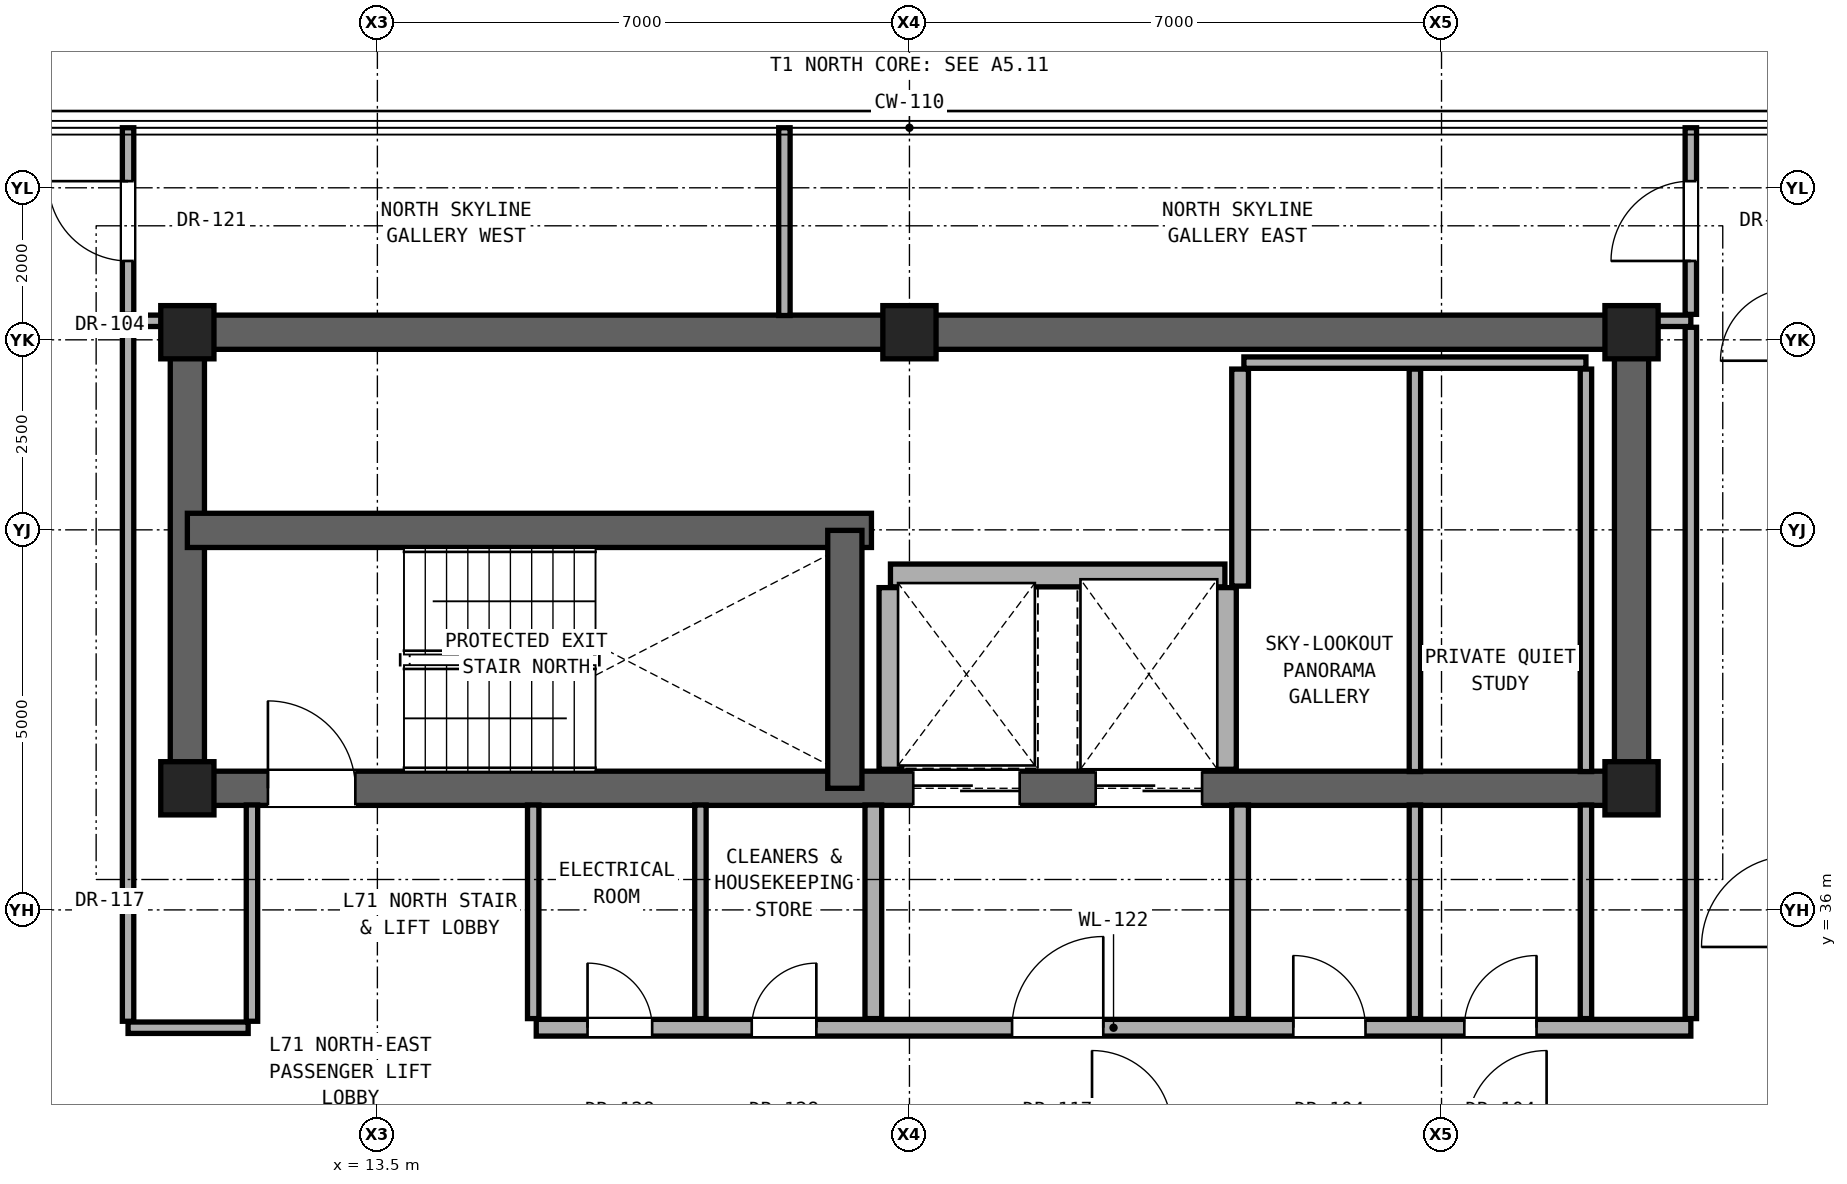
"""IFC4 building model, lengths in metres.
Left out: names, types, materials, properties, quantities, classifications, styles, units other than length and angle.
Written with IfcOpenShell. Run it as: python <this file> out.ifc"""

import sys

from ifc_helpers import new_model, si_unit, direction, frame, frame_2d, origin, origin_2d, place, context, subcontext, project, spatial, rectangle, extrude, element, fill, save


model = new_model("IFC4")
c1 = context("Model", 3, precision=1e-05, world=origin(), true_north=direction((0.0, 1.0)))
c2 = subcontext(c1, "Body", "Model", "MODEL_VIEW")
j1 = project(units=[si_unit("LENGTHUNIT", "METRE"), si_unit("PLANEANGLEUNIT", "RADIAN")], contexts=[c1])
p1 = place(None, origin())
s1 = spatial("IfcSite", under=j1, at=p1, CompositionType="ELEMENT")
p2 = place(p1, origin())
s2 = spatial("IfcBuilding", under=s1, at=p2, CompositionType="ELEMENT")
p3 = place(p2, frame((0.0, 0.0, 249.1)))
s3 = spatial("IfcBuildingStorey", under=s2, at=p3, CompositionType="ELEMENT", Elevation=249.1)
for number, where, z_axis, x_axis in (
    (1, (11.0, 37.6, 0.0), (0.0, 0.0, 1.0), (1.0, 0.0, 0.0)),
    (2, (30.0, 37.6, 0.0), (0.0, 0.0, 1.0), (1.0, 0.0, 0.0)),
    (3, (11.0, 43.6, 0.0), (0.0, 0.0, 1.0), (1.0, 0.0, 0.0)),
    (4, (20.5, 43.6, 0.0), (0.0, 0.0, 1.0), (1.0, 0.0, 0.0)),
    (5, (30.0, 43.6, 0.0), (0.0, 0.0, 1.0), (1.0, 0.0, 0.0)),
):
    element("IfcColumn", number, at=place(p3, frame(where, z_axis=z_axis, x_axis=x_axis)), inside=s3, PredefinedType="COLUMN", context=c2, shape_type="SweptSolid", body=[
        extrude(rectangle(XDim=0.7, YDim=0.7, at=origin_2d()), origin(), (0.0, 0.0, 1.0), 3.6),
    ])
p4 = place(p3, frame((11.0, 43.6, 0.0), z_axis=(0.0, 0.0, 1.0), x_axis=(1.0, 0.0, 0.0)))
e6 = element("IfcWall", 6, at=p4, inside=s3, PredefinedType="SHEAR", context=c2, shape_type="SweptSolid", body=[
    extrude(rectangle(XDim=19.0, YDim=0.45, at=frame_2d((9.5, 0.0))), origin(), (0.0, 0.0, 1.0), 3.4),
])
for number, where, z_axis, x_axis in (
    (7, (11.0, 37.6, 0.0), (0.0, 0.0, 1.0), (0.0, 1.0, 0.0)),
    (8, (30.0, 37.6, 0.0), (0.0, 0.0, 1.0), (0.0, 1.0, 0.0)),
):
    element("IfcWall", number, at=place(p3, frame(where, z_axis=z_axis, x_axis=x_axis)), inside=s3, PredefinedType="SHEAR", context=c2, shape_type="SweptSolid", body=[
        extrude(rectangle(XDim=6.0, YDim=0.45, at=frame_2d((3.0, 0.0))), origin(), (0.0, 0.0, 1.0), 3.4),
    ])
p5 = place(p3, frame((11.0, 37.6, 0.0), z_axis=(0.0, 0.0, 1.0), x_axis=(1.0, 0.0, 0.0)))
e9 = element("IfcWall", 9, at=p5, inside=s3, PredefinedType="SHEAR", context=c2, shape_type="SweptSolid", body=[
    extrude(rectangle(XDim=19.0, YDim=0.45, at=frame_2d((9.5, 0.0))), origin(), (0.0, 0.0, 1.0), 3.4),
])
p6 = place(p5, frame((1.06, 0.0, 0.0)))
e10 = element("IfcOpeningElement", 10, at=p6, cuts=e9, PredefinedType="OPENING", context=c2, shape_type="SweptSolid", body=[
    extrude(rectangle(XDim=1.15, YDim=2.2, at=frame_2d((0.575, 1.1))), frame((0.0, 0.235, 0.0), z_axis=(0.0, -1.0, 0.0), x_axis=(1.0, 0.0, 0.0)), (0.0, 0.0, 1.0), 0.47),
])
p7 = place(p5, frame((9.55, 0.0, 0.0)))
e11 = element("IfcOpeningElement", 11, at=p7, cuts=e9, PredefinedType="OPENING", context=c2, shape_type="SweptSolid", body=[
    extrude(rectangle(XDim=1.4, YDim=2.35, at=frame_2d((0.7, 1.175))), frame((0.0, 0.235, 0.0), z_axis=(0.0, -1.0, 0.0), x_axis=(1.0, 0.0, 0.0)), (0.0, 0.0, 1.0), 0.47),
])
p8 = place(p5, frame((11.95, 0.0, 0.0)))
e12 = element("IfcOpeningElement", 12, at=p8, cuts=e9, PredefinedType="OPENING", context=c2, shape_type="SweptSolid", body=[
    extrude(rectangle(XDim=1.4, YDim=2.35, at=frame_2d((0.7, 1.175))), frame((0.0, 0.235, 0.0), z_axis=(0.0, -1.0, 0.0), x_axis=(1.0, 0.0, 0.0)), (0.0, 0.0, 1.0), 0.47),
])
p9 = place(p3, frame((11.0, 40.993, 0.0), z_axis=(0.0, 0.0, 1.0), x_axis=(1.0, 0.0, 0.0)))
e13 = element("IfcWall", 13, at=p9, inside=s3, PredefinedType="SHEAR", context=c2, shape_type="SweptSolid", body=[
    extrude(rectangle(XDim=9.0, YDim=0.45, at=frame_2d((4.5, 0.0))), origin(), (0.0, 0.0, 1.0), 3.4),
])
p10 = place(p3, frame((19.65, 37.6, 0.0), z_axis=(0.0, 0.0, 1.0), x_axis=(0.0, 1.0, 0.0)))
e14 = element("IfcWall", 14, at=p10, inside=s3, PredefinedType="SHEAR", context=c2, shape_type="SweptSolid", body=[
    extrude(rectangle(XDim=3.393, YDim=0.45, at=frame_2d((1.696, 0.0))), origin(), (0.0, 0.0, 1.0), 3.4),
])
p11 = place(p3, frame((10.22, 34.45, 0.0), z_axis=(0.0, 0.0, 1.0), x_axis=(1.0, 0.0, 0.0)))
e15 = element("IfcWall", 15, at=p11, inside=s3, PredefinedType="PARTITIONING", context=c2, shape_type="SweptSolid", body=[
    extrude(rectangle(XDim=1.58, YDim=0.15, at=frame_2d((0.79, 0.0))), origin(), (0.0, 0.0, 1.0), 2.536),
])
p12 = place(p3, frame((15.59, 34.45, 0.0), z_axis=(0.0, 0.0, 1.0), x_axis=(1.0, 0.0, 0.0)))
e16 = element("IfcWall", 16, at=p12, inside=s3, PredefinedType="SOLIDWALL", context=c2, shape_type="SweptSolid", body=[
    extrude(rectangle(XDim=15.19, YDim=0.22, at=frame_2d((7.595, 0.0))), origin(), (0.0, 0.0, 1.0), 2.536),
])
p13 = place(p12, frame((6.26, 0.0, 0.0)))
e17 = element("IfcOpeningElement", 17, at=p13, cuts=e16, PredefinedType="OPENING", context=c2, shape_type="SweptSolid", body=[
    extrude(rectangle(XDim=1.2, YDim=2.25, at=frame_2d((0.6, 1.125))), frame((0.0, 0.12, 0.0), z_axis=(0.0, -1.0, 0.0), x_axis=(1.0, 0.0, 0.0)), (0.0, 0.0, 1.0), 0.24),
])
p14 = place(p12, frame((9.96, 0.0, 0.0)))
e18 = element("IfcOpeningElement", 18, at=p14, cuts=e16, PredefinedType="OPENING", context=c2, shape_type="SweptSolid", body=[
    extrude(rectangle(XDim=0.95, YDim=2.15, at=frame_2d((0.475, 1.075))), frame((0.0, 0.12, 0.0), z_axis=(0.0, -1.0, 0.0), x_axis=(1.0, 0.0, 0.0)), (0.0, 0.0, 1.0), 0.24),
])
p15 = place(p12, frame((12.21, 0.0, 0.0)))
e19 = element("IfcOpeningElement", 19, at=p15, cuts=e16, PredefinedType="OPENING", context=c2, shape_type="SweptSolid", body=[
    extrude(rectangle(XDim=0.95, YDim=2.15, at=frame_2d((0.475, 1.075))), frame((0.0, 0.12, 0.0), z_axis=(0.0, -1.0, 0.0), x_axis=(1.0, 0.0, 0.0)), (0.0, 0.0, 1.0), 0.24),
])
p16 = place(p12, frame((0.675, 0.0, 0.0)))
e20 = element("IfcOpeningElement", 20, at=p16, cuts=e16, PredefinedType="OPENING", context=c2, shape_type="SweptSolid", body=[
    extrude(rectangle(XDim=0.85, YDim=2.01, at=frame_2d((0.425, 1.005))), frame((0.0, 0.12, 0.0), z_axis=(0.0, -1.0, 0.0), x_axis=(1.0, 0.0, 0.0)), (0.0, 0.0, 1.0), 0.24),
])
p17 = place(p12, frame((2.835, 0.0, 0.0)))
e21 = element("IfcOpeningElement", 21, at=p17, cuts=e16, PredefinedType="OPENING", context=c2, shape_type="SweptSolid", body=[
    extrude(rectangle(XDim=0.85, YDim=2.01, at=frame_2d((0.425, 1.005))), frame((0.0, 0.12, 0.0), z_axis=(0.0, -1.0, 0.0), x_axis=(1.0, 0.0, 0.0)), (0.0, 0.0, 1.0), 0.24),
])
p18 = place(p3, frame((20.25, 40.4, 0.0), z_axis=(0.0, 0.0, 1.0), x_axis=(1.0, 0.0, 0.0)))
e22 = element("IfcWall", 22, at=p18, inside=s3, PredefinedType="SOLIDWALL", context=c2, shape_type="SweptSolid", body=[
    extrude(rectangle(XDim=4.4, YDim=0.3, at=frame_2d((2.2, 0.0))), origin(), (0.0, 0.0, 1.0), 3.4),
])
p19 = place(p3, frame((24.9, 43.2, 0.0), z_axis=(0.0, 0.0, 1.0), x_axis=(1.0, 0.0, 0.0)))
e23 = element("IfcWall", 23, at=p19, inside=s3, PredefinedType="PARTITIONING", context=c2, shape_type="SweptSolid", body=[
    extrude(rectangle(XDim=4.5, YDim=0.15, at=frame_2d((2.25, 0.0))), origin(), (0.0, 0.0, 1.0), 3.4),
])
for number, where, z_axis, x_axis in (
    (24, (10.22, 43.75, 0.0), (0.0, 0.0, 1.0), (1.0, 0.0, 0.0)),
    (25, (30.22, 43.75, 0.0), (0.0, 0.0, 1.0), (1.0, 0.0, 0.0)),
):
    element("IfcWall", number, at=place(p3, frame(where, z_axis=z_axis, x_axis=x_axis)), inside=s3, PredefinedType="PARTITIONING", context=c2, shape_type="SweptSolid", body=[
        extrude(rectangle(XDim=0.56, YDim=0.15, at=frame_2d((0.28, 0.0))), origin(), (0.0, 0.0, 1.0), 3.4),
    ])
p20 = place(p3, frame((10.22, 34.535, 0.0), z_axis=(0.0, 0.0, 1.0), x_axis=(0.0, 1.0, 0.0)))
e26 = element("IfcWall", 26, at=p20, inside=s3, PredefinedType="PARTITIONING", context=c2, shape_type="SweptSolid", body=[
    extrude(rectangle(XDim=9.13, YDim=0.15, at=frame_2d((4.565, 0.0))), origin(), (0.0, 0.0, 1.0), 2.792),
])
p21 = place(p3, frame((10.22, 43.835, 0.0), z_axis=(0.0, 0.0, 1.0), x_axis=(0.0, 1.0, 0.0)))
e27 = element("IfcWall", 27, at=p21, inside=s3, PredefinedType="PARTITIONING", context=c2, shape_type="SweptSolid", body=[
    extrude(rectangle(XDim=2.455, YDim=0.15, at=frame_2d((1.228, 0.0))), origin(), (0.0, 0.0, 1.0), 3.4),
])
p22 = place(p21, frame((0.702, 0.0, 0.0)))
e28 = element("IfcOpeningElement", 28, at=p22, cuts=e27, PredefinedType="OPENING", context=c2, shape_type="SweptSolid", body=[
    extrude(rectangle(XDim=1.05, YDim=2.2, at=frame_2d((0.525, 1.1))), frame((0.0, 0.085, 0.0), z_axis=(0.0, -1.0, 0.0), x_axis=(1.0, 0.0, 0.0)), (0.0, 0.0, 1.0), 0.17),
])
p23 = place(p3, frame((11.85, 34.535, 0.0), z_axis=(0.0, 0.0, 1.0), x_axis=(0.0, 1.0, 0.0)))
e29 = element("IfcWall", 29, at=p23, inside=s3, PredefinedType="PARTITIONING", context=c2, shape_type="SweptSolid", body=[
    extrude(rectangle(XDim=2.845, YDim=0.15, at=frame_2d((1.422, 0.0))), origin(), (0.0, 0.0, 1.0), 3.4),
])
for number, where, z_axis, x_axis in (
    (30, (15.55, 34.57, 0.0), (0.0, 0.0, 1.0), (0.0, 1.0, 0.0)),
    (31, (17.75, 34.57, 0.0), (0.0, 0.0, 1.0), (0.0, 1.0, 0.0)),
):
    element("IfcWall", number, at=place(p3, frame(where, z_axis=z_axis, x_axis=x_axis)), inside=s3, PredefinedType="PARTITIONING", context=c2, shape_type="SweptSolid", body=[
        extrude(rectangle(XDim=2.81, YDim=0.15, at=frame_2d((1.405, 0.0))), origin(), (0.0, 0.0, 1.0), 3.4),
    ])
p24 = place(p3, frame((18.855, 43.82, 0.0), z_axis=(0.0, 0.0, 1.0), x_axis=(0.0, 1.0, 0.0)))
e32 = element("IfcWall", 32, at=p24, inside=s3, PredefinedType="PARTITIONING", context=c2, shape_type="SweptSolid", body=[
    extrude(rectangle(XDim=2.47, YDim=0.15, at=frame_2d((1.235, 0.0))), origin(), (0.0, 0.0, 1.0), 3.4),
])
p25 = place(p3, frame((20.025, 34.57, 0.0), z_axis=(0.0, 0.0, 1.0), x_axis=(0.0, 1.0, 0.0)))
e33 = element("IfcWall", 33, at=p25, inside=s3, PredefinedType="SOLIDWALL", context=c2, shape_type="SweptSolid", body=[
    extrude(rectangle(XDim=2.81, YDim=0.22, at=frame_2d((1.405, 0.0))), origin(), (0.0, 0.0, 1.0), 3.4),
])
for number, where, z_axis, x_axis in (
    (34, (20.25, 37.85, 0.0), (0.0, 0.0, 1.0), (0.0, 1.0, 0.0)),
    (35, (24.65, 37.85, 0.0), (0.0, 0.0, 1.0), (0.0, 1.0, 0.0)),
):
    element("IfcWall", number, at=place(p3, frame(where, z_axis=z_axis, x_axis=x_axis)), inside=s3, PredefinedType="SOLIDWALL", context=c2, shape_type="SweptSolid", body=[
        extrude(rectangle(XDim=2.39, YDim=0.3, at=frame_2d((1.195, 0.0))), origin(), (0.0, 0.0, 1.0), 3.4),
    ])
p26 = place(p3, frame((24.85, 34.57, 0.0), z_axis=(0.0, 0.0, 1.0), x_axis=(0.0, 1.0, 0.0)))
e36 = element("IfcWall", 36, at=p26, inside=s3, PredefinedType="SOLIDWALL", context=c2, shape_type="SweptSolid", body=[
    extrude(rectangle(XDim=2.81, YDim=0.22, at=frame_2d((1.405, 0.0))), origin(), (0.0, 0.0, 1.0), 3.4),
])
p27 = place(p3, frame((24.85, 40.26, 0.0), z_axis=(0.0, 0.0, 1.0), x_axis=(0.0, 1.0, 0.0)))
e37 = element("IfcWall", 37, at=p27, inside=s3, PredefinedType="SOLIDWALL", context=c2, shape_type="SweptSolid", body=[
    extrude(rectangle(XDim=2.855, YDim=0.22, at=frame_2d((1.427, 0.0))), origin(), (0.0, 0.0, 1.0), 3.4),
])
p28 = place(p3, frame((27.15, 34.57, 0.0), z_axis=(0.0, 0.0, 1.0), x_axis=(0.0, 1.0, 0.0)))
e38 = element("IfcWall", 38, at=p28, inside=s3, PredefinedType="PARTITIONING", context=c2, shape_type="SweptSolid", body=[
    extrude(rectangle(XDim=2.81, YDim=0.15, at=frame_2d((1.405, 0.0))), origin(), (0.0, 0.0, 1.0), 3.4),
])
p29 = place(p3, frame((27.15, 37.82, 0.0), z_axis=(0.0, 0.0, 1.0), x_axis=(0.0, 1.0, 0.0)))
e39 = element("IfcWall", 39, at=p29, inside=s3, PredefinedType="PARTITIONING", context=c2, shape_type="SweptSolid", body=[
    extrude(rectangle(XDim=5.295, YDim=0.15, at=frame_2d((2.647, 0.0))), origin(), (0.0, 0.0, 1.0), 3.4),
])
p30 = place(p3, frame((29.4, 34.57, 0.0), z_axis=(0.0, 0.0, 1.0), x_axis=(0.0, 1.0, 0.0)))
e40 = element("IfcWall", 40, at=p30, inside=s3, PredefinedType="PARTITIONING", context=c2, shape_type="SweptSolid", body=[
    extrude(rectangle(XDim=2.81, YDim=0.15, at=frame_2d((1.405, 0.0))), origin(), (0.0, 0.0, 1.0), 3.4),
])
p31 = place(p3, frame((29.4, 37.82, 0.0), z_axis=(0.0, 0.0, 1.0), x_axis=(0.0, 1.0, 0.0)))
e41 = element("IfcWall", 41, at=p31, inside=s3, PredefinedType="PARTITIONING", context=c2, shape_type="SweptSolid", body=[
    extrude(rectangle(XDim=5.295, YDim=0.15, at=frame_2d((2.647, 0.0))), origin(), (0.0, 0.0, 1.0), 3.4),
])
p32 = place(p3, frame((30.78, 34.57, 0.0), z_axis=(0.0, 0.0, 1.0), x_axis=(0.0, 1.0, 0.0)))
e42 = element("IfcWall", 42, at=p32, inside=s3, PredefinedType="PARTITIONING", context=c2, shape_type="SweptSolid", body=[
    extrude(rectangle(XDim=9.095, YDim=0.15, at=frame_2d((4.547, 0.0))), origin(), (0.0, 0.0, 1.0), 2.792),
])
p33 = place(p3, frame((30.78, 43.835, 0.0), z_axis=(0.0, 0.0, 1.0), x_axis=(0.0, 1.0, 0.0)))
e43 = element("IfcWall", 43, at=p33, inside=s3, PredefinedType="PARTITIONING", context=c2, shape_type="SweptSolid", body=[
    extrude(rectangle(XDim=2.455, YDim=0.15, at=frame_2d((1.228, 0.0))), origin(), (0.0, 0.0, 1.0), 3.4),
])
p34 = place(p33, frame((0.702, 0.0, 0.0)))
e44 = element("IfcOpeningElement", 44, at=p34, cuts=e43, PredefinedType="OPENING", context=c2, shape_type="SweptSolid", body=[
    extrude(rectangle(XDim=1.05, YDim=2.2, at=frame_2d((0.525, 1.1))), frame((0.0, 0.085, 0.0), z_axis=(0.0, -1.0, 0.0), x_axis=(1.0, 0.0, 0.0)), (0.0, 0.0, 1.0), 0.17),
])
p35 = place(p6, origin())
e45 = element("IfcDoor", 45, at=p35, inside=s3, OperationType="SINGLE_SWING_LEFT", PredefinedType="DOOR", context=c2, shape_type="SweptSolid", body=[
    extrude(rectangle(XDim=1.15, YDim=2.2, at=frame_2d((0.575, 1.1))), frame((0.0, 0.025, 0.0), z_axis=(0.0, -1.0, 0.0), x_axis=(1.0, 0.0, 0.0)), (0.0, 0.0, 1.0), 0.05),
])
fill(e10, e45)
p36 = place(p13, origin())
e46 = element("IfcDoor", 46, at=p36, inside=s3, OperationType="SINGLE_SWING_RIGHT", PredefinedType="DOOR", context=c2, shape_type="SweptSolid", body=[
    extrude(rectangle(XDim=1.2, YDim=2.25, at=frame_2d((0.6, 1.125))), frame((0.0, 0.025, 0.0), z_axis=(0.0, -1.0, 0.0), x_axis=(1.0, 0.0, 0.0)), (0.0, 0.0, 1.0), 0.05),
])
fill(e17, e46)
p37 = place(p14, origin())
e47 = element("IfcDoor", 47, at=p37, inside=s3, OperationType="SINGLE_SWING_LEFT", PredefinedType="DOOR", context=c2, shape_type="SweptSolid", body=[
    extrude(rectangle(XDim=0.95, YDim=2.15, at=frame_2d((0.475, 1.075))), frame((0.0, 0.025, 0.0), z_axis=(0.0, -1.0, 0.0), x_axis=(1.0, 0.0, 0.0)), (0.0, 0.0, 1.0), 0.05),
])
fill(e18, e47)
p38 = place(p15, origin())
e48 = element("IfcDoor", 48, at=p38, inside=s3, OperationType="SINGLE_SWING_RIGHT", PredefinedType="DOOR", context=c2, shape_type="SweptSolid", body=[
    extrude(rectangle(XDim=0.95, YDim=2.15, at=frame_2d((0.475, 1.075))), frame((0.0, 0.025, 0.0), z_axis=(0.0, -1.0, 0.0), x_axis=(1.0, 0.0, 0.0)), (0.0, 0.0, 1.0), 0.05),
])
fill(e19, e48)
p39 = place(p16, origin())
e49 = element("IfcDoor", 49, at=p39, inside=s3, OperationType="SINGLE_SWING_LEFT", PredefinedType="DOOR", context=c2, shape_type="SweptSolid", body=[
    extrude(rectangle(XDim=0.85, YDim=2.01, at=frame_2d((0.425, 1.005))), frame((0.0, 0.025, 0.0), z_axis=(0.0, -1.0, 0.0), x_axis=(1.0, 0.0, 0.0)), (0.0, 0.0, 1.0), 0.05),
])
fill(e20, e49)
p40 = place(p17, origin())
e50 = element("IfcDoor", 50, at=p40, inside=s3, OperationType="SINGLE_SWING_RIGHT", PredefinedType="DOOR", context=c2, shape_type="SweptSolid", body=[
    extrude(rectangle(XDim=0.85, YDim=2.01, at=frame_2d((0.425, 1.005))), frame((0.0, 0.025, 0.0), z_axis=(0.0, -1.0, 0.0), x_axis=(1.0, 0.0, 0.0)), (0.0, 0.0, 1.0), 0.05),
])
fill(e21, e50)
p41 = place(p22, origin())
e51 = element("IfcDoor", 51, at=p41, inside=s3, OperationType="SINGLE_SWING_RIGHT", PredefinedType="DOOR", context=c2, shape_type="SweptSolid", body=[
    extrude(rectangle(XDim=1.05, YDim=2.2, at=frame_2d((0.525, 1.1))), frame((0.0, 0.025, 0.0), z_axis=(0.0, -1.0, 0.0), x_axis=(1.0, 0.0, 0.0)), (0.0, 0.0, 1.0), 0.05),
])
fill(e28, e51)
p42 = place(p34, origin())
e52 = element("IfcDoor", 52, at=p42, inside=s3, OperationType="SINGLE_SWING_LEFT", PredefinedType="DOOR", context=c2, shape_type="SweptSolid", body=[
    extrude(rectangle(XDim=1.05, YDim=2.2, at=frame_2d((0.525, 1.1))), frame((0.0, 0.025, 0.0), z_axis=(0.0, -1.0, 0.0), x_axis=(1.0, 0.0, 0.0)), (0.0, 0.0, 1.0), 0.05),
])
fill(e44, e52)
p43 = place(p7, origin())
e53 = element("IfcDoor", 53, at=p43, inside=s3, OperationType="DOUBLE_DOOR_SLIDING", PredefinedType="DOOR", context=c2, shape_type="SweptSolid", body=[
    extrude(rectangle(XDim=1.4, YDim=2.35, at=frame_2d((0.7, 1.175))), frame((0.0, 0.025, 0.0), z_axis=(0.0, -1.0, 0.0), x_axis=(1.0, 0.0, 0.0)), (0.0, 0.0, 1.0), 0.05),
])
fill(e11, e53)
p44 = place(p8, origin())
e54 = element("IfcDoor", 54, at=p44, inside=s3, OperationType="DOUBLE_DOOR_SLIDING", PredefinedType="DOOR", context=c2, shape_type="SweptSolid", body=[
    extrude(rectangle(XDim=1.4, YDim=2.35, at=frame_2d((0.7, 1.175))), frame((0.0, 0.025, 0.0), z_axis=(0.0, -1.0, 0.0), x_axis=(1.0, 0.0, 0.0)), (0.0, 0.0, 1.0), 0.05),
])
fill(e12, e54)
save(model, sys.argv[1])
